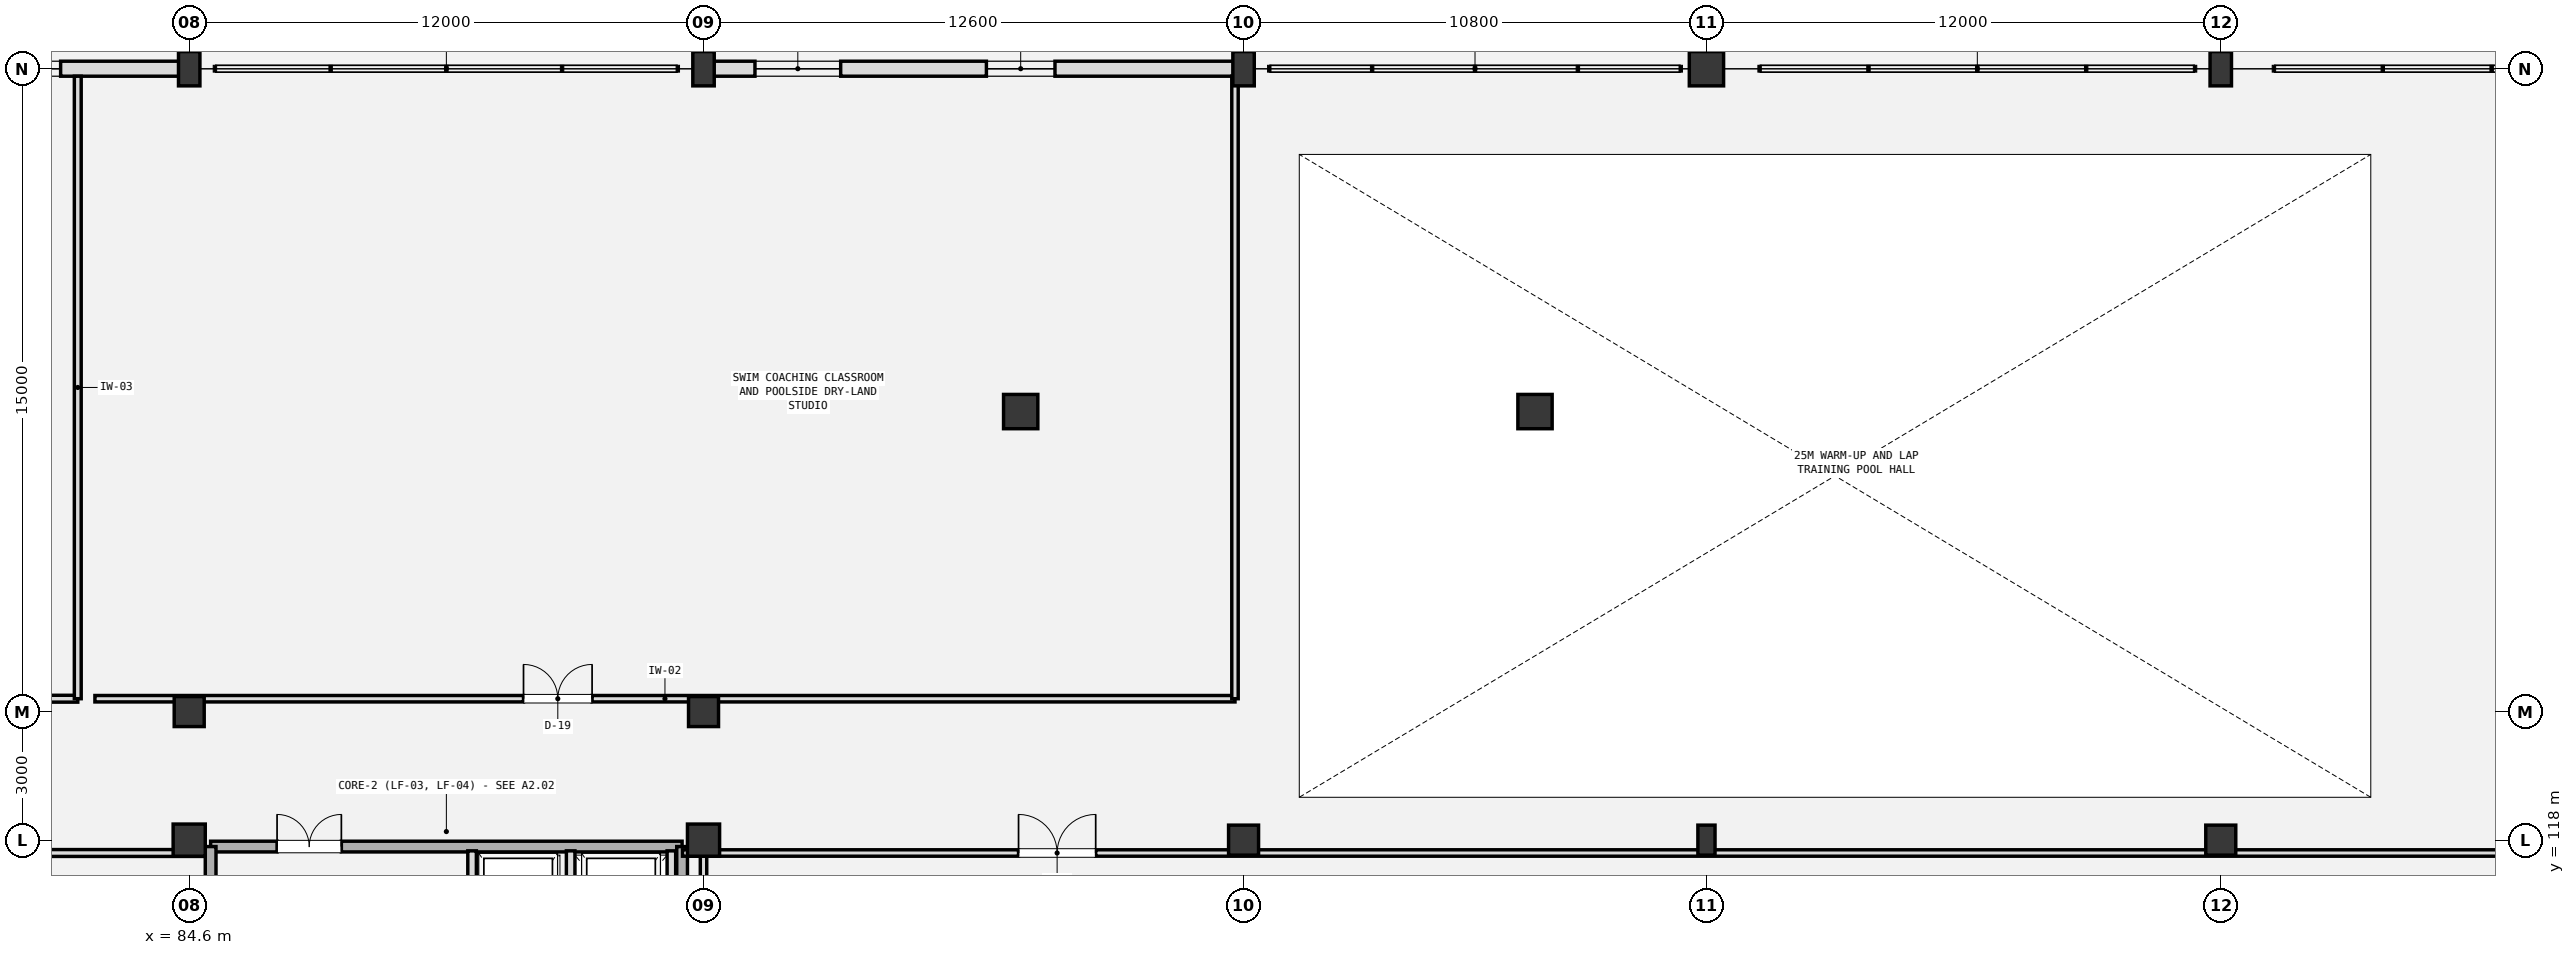
"""IFC4 building model, lengths in metres.
Left out: names, types, materials, properties, quantities, classifications, styles, units other than length and angle.
Written with IfcOpenShell. Run it as: python <this file> out.ifc"""

import sys

from ifc_helpers import new_model, si_unit, direction, frame, frame_2d, origin, origin_2d, place, context, subcontext, project, spatial, rectangle, extrude, element, fill, save


model = new_model("IFC4")
c1 = context("Model", 3, precision=1e-05, world=origin(), true_north=direction((0.0, 1.0)))
c2 = subcontext(c1, "Body", "Model", "MODEL_VIEW")
j1 = project(units=[si_unit("LENGTHUNIT", "METRE"), si_unit("PLANEANGLEUNIT", "RADIAN")], contexts=[c1])
p1 = place(None, origin())
s1 = spatial("IfcSite", under=j1, at=p1, CompositionType="ELEMENT")
p2 = place(p1, origin())
s2 = spatial("IfcBuilding", under=s1, at=p2, CompositionType="ELEMENT")
p3 = place(p2, origin())
s3 = spatial("IfcBuildingStorey", under=s2, at=p3, CompositionType="ELEMENT", Elevation=0.0)
p4 = place(p3, frame((84.6, 118.0, 0.0), z_axis=(0.0, 0.0, 1.0), x_axis=(1.0, 0.0, 0.0)))
e1 = element("IfcColumn", 1, at=p4, inside=s3, PredefinedType="COLUMN", context=c2, shape_type="SweptSolid", body=[
    extrude(rectangle(XDim=0.75, YDim=0.75, at=origin_2d()), origin(), (0.0, 0.0, 1.0), 5.4),
])
p5 = place(p3, frame((84.6, 121.0, 0.0), z_axis=(0.0, 0.0, 1.0), x_axis=(1.0, 0.0, 0.0)))
e2 = element("IfcColumn", 2, at=p5, inside=s3, PredefinedType="COLUMN", context=c2, shape_type="SweptSolid", body=[
    extrude(rectangle(XDim=0.7, YDim=0.7, at=origin_2d()), origin(), (0.0, 0.0, 1.0), 5.4),
])
p6 = place(p3, frame((84.6, 136.0, 0.0), z_axis=(0.0, 0.0, 1.0), x_axis=(1.0, 0.0, 0.0)))
e3 = element("IfcColumn", 3, at=p6, inside=s3, PredefinedType="COLUMN", context=c2, shape_type="SweptSolid", body=[
    extrude(rectangle(XDim=0.5, YDim=0.8, at=origin_2d()), origin(), (0.0, 0.0, 1.0), 5.4),
])
p7 = place(p3, frame((96.6, 118.0, 0.0), z_axis=(0.0, 0.0, 1.0), x_axis=(1.0, 0.0, 0.0)))
e4 = element("IfcColumn", 4, at=p7, inside=s3, PredefinedType="COLUMN", context=c2, shape_type="SweptSolid", body=[
    extrude(rectangle(XDim=0.75, YDim=0.75, at=origin_2d()), origin(), (0.0, 0.0, 1.0), 5.4),
])
p8 = place(p3, frame((96.6, 121.0, 0.0), z_axis=(0.0, 0.0, 1.0), x_axis=(1.0, 0.0, 0.0)))
e5 = element("IfcColumn", 5, at=p8, inside=s3, PredefinedType="COLUMN", context=c2, shape_type="SweptSolid", body=[
    extrude(rectangle(XDim=0.7, YDim=0.7, at=origin_2d()), origin(), (0.0, 0.0, 1.0), 5.4),
])
p9 = place(p3, frame((96.6, 136.0, 0.0), z_axis=(0.0, 0.0, 1.0), x_axis=(1.0, 0.0, 0.0)))
e6 = element("IfcColumn", 6, at=p9, inside=s3, PredefinedType="COLUMN", context=c2, shape_type="SweptSolid", body=[
    extrude(rectangle(XDim=0.5, YDim=0.8, at=origin_2d()), origin(), (0.0, 0.0, 1.0), 5.4),
])
p10 = place(p3, frame((104.0, 128.0, 0.0), z_axis=(0.0, 0.0, 1.0), x_axis=(1.0, 0.0, 0.0)))
e7 = element("IfcColumn", 7, at=p10, inside=s3, PredefinedType="COLUMN", context=c2, shape_type="SweptSolid", body=[
    extrude(rectangle(XDim=0.8, YDim=0.8, at=origin_2d()), origin(), (0.0, 0.0, 1.0), 5.4),
])
p11 = place(p3, frame((109.2, 118.0, 0.0), z_axis=(0.0, 0.0, 1.0), x_axis=(1.0, 0.0, 0.0)))
e8 = element("IfcColumn", 8, at=p11, inside=s3, PredefinedType="COLUMN", context=c2, shape_type="SweptSolid", body=[
    extrude(rectangle(XDim=0.7, YDim=0.7, at=origin_2d()), origin(), (0.0, 0.0, 1.0), 5.4),
])
p12 = place(p3, frame((109.2, 136.0, 0.0), z_axis=(0.0, 0.0, 1.0), x_axis=(1.0, 0.0, 0.0)))
e9 = element("IfcColumn", 9, at=p12, inside=s3, PredefinedType="COLUMN", context=c2, shape_type="SweptSolid", body=[
    extrude(rectangle(XDim=0.5, YDim=0.8, at=origin_2d()), origin(), (0.0, 0.0, 1.0), 5.4),
])
p13 = place(p3, frame((116.0, 128.0, 0.0), z_axis=(0.0, 0.0, 1.0), x_axis=(1.0, 0.0, 0.0)))
e10 = element("IfcColumn", 10, at=p13, inside=s3, PredefinedType="COLUMN", context=c2, shape_type="SweptSolid", body=[
    extrude(rectangle(XDim=0.8, YDim=0.8, at=origin_2d()), origin(), (0.0, 0.0, 1.0), 5.4),
])
p14 = place(p3, frame((120.0, 118.0, 0.0), z_axis=(0.0, 0.0, 1.0), x_axis=(1.0, 0.0, 0.0)))
e11 = element("IfcColumn", 11, at=p14, inside=s3, PredefinedType="PILASTER", context=c2, shape_type="SweptSolid", body=[
    extrude(rectangle(XDim=0.4, YDim=0.7, at=origin_2d()), origin(), (0.0, 0.0, 1.0), 5.4),
])
p15 = place(p3, frame((120.0, 136.0, 0.0), z_axis=(0.0, 0.0, 1.0), x_axis=(1.0, 0.0, 0.0)))
e12 = element("IfcColumn", 12, at=p15, inside=s3, PredefinedType="COLUMN", context=c2, shape_type="SweptSolid", body=[
    extrude(rectangle(XDim=0.8, YDim=0.8, at=origin_2d()), origin(), (0.0, 0.0, 1.0), 5.4),
])
p16 = place(p3, frame((132.0, 118.0, 0.0), z_axis=(0.0, 0.0, 1.0), x_axis=(1.0, 0.0, 0.0)))
e13 = element("IfcColumn", 13, at=p16, inside=s3, PredefinedType="COLUMN", context=c2, shape_type="SweptSolid", body=[
    extrude(rectangle(XDim=0.7, YDim=0.7, at=origin_2d()), origin(), (0.0, 0.0, 1.0), 5.4),
])
p17 = place(p3, frame((132.0, 136.0, 0.0), z_axis=(0.0, 0.0, 1.0), x_axis=(1.0, 0.0, 0.0)))
e14 = element("IfcColumn", 14, at=p17, inside=s3, PredefinedType="COLUMN", context=c2, shape_type="SweptSolid", body=[
    extrude(rectangle(XDim=0.5, YDim=0.8, at=origin_2d()), origin(), (0.0, 0.0, 1.0), 5.4),
])
p18 = place(p3, frame((72.6, 136.0, 0.0), z_axis=(0.0, 0.0, 1.0), x_axis=(1.0, 0.0, 0.0)))
e15 = element("IfcWall", 15, at=p18, inside=s3, PredefinedType="SOLIDWALL", context=c2, shape_type="SweptSolid", body=[
    extrude(rectangle(XDim=12.0, YDim=0.35, at=frame_2d((6.0, 0.0))), origin(), (0.0, 0.0, 1.0), 4.53),
])
p19 = place(p18, frame((1.2, 0.0, 0.95)))
e16 = element("IfcOpeningElement", 16, at=p19, cuts=e15, PredefinedType="OPENING", context=c2, shape_type="SweptSolid", body=[
    extrude(rectangle(XDim=2.8, YDim=1.2, at=frame_2d((1.4, 0.6))), frame((0.0, 0.185, 0.0), z_axis=(0.0, -1.0, 0.0), x_axis=(1.0, 0.0, 0.0)), (0.0, 0.0, 1.0), 0.37),
])
p20 = place(p18, frame((6.6, 0.0, 0.95)))
e17 = element("IfcOpeningElement", 17, at=p20, cuts=e15, PredefinedType="OPENING", context=c2, shape_type="SweptSolid", body=[
    extrude(rectangle(XDim=2.4, YDim=1.2, at=frame_2d((1.2, 0.6))), frame((0.0, 0.185, 0.0), z_axis=(0.0, -1.0, 0.0), x_axis=(1.0, 0.0, 0.0)), (0.0, 0.0, 1.0), 0.37),
])
p21 = place(p3, frame((96.6, 136.0, 0.0), z_axis=(0.0, 0.0, 1.0), x_axis=(1.0, 0.0, 0.0)))
e18 = element("IfcWall", 18, at=p21, inside=s3, PredefinedType="SOLIDWALL", context=c2, shape_type="SweptSolid", body=[
    extrude(rectangle(XDim=12.6, YDim=0.35, at=frame_2d((6.3, 0.0))), origin(), (0.0, 0.0, 1.0), 4.84),
])
p22 = place(p21, frame((1.2, 0.0, 0.95)))
e19 = element("IfcOpeningElement", 19, at=p22, cuts=e18, PredefinedType="OPENING", context=c2, shape_type="SweptSolid", body=[
    extrude(rectangle(XDim=2.0, YDim=1.2, at=frame_2d((1.0, 0.6))), frame((0.0, 0.185, 0.0), z_axis=(0.0, -1.0, 0.0), x_axis=(1.0, 0.0, 0.0)), (0.0, 0.0, 1.0), 0.37),
])
p23 = place(p21, frame((6.6, 0.0, 0.95)))
e20 = element("IfcOpeningElement", 20, at=p23, cuts=e18, PredefinedType="OPENING", context=c2, shape_type="SweptSolid", body=[
    extrude(rectangle(XDim=1.6, YDim=1.2, at=frame_2d((0.8, 0.6))), frame((0.0, 0.185, 0.0), z_axis=(0.0, -1.0, 0.0), x_axis=(1.0, 0.0, 0.0)), (0.0, 0.0, 1.0), 0.37),
])
p24 = place(p3, frame((85.1, 117.85, 0.0), z_axis=(0.0, 0.0, 1.0), x_axis=(1.0, 0.0, 0.0)))
e21 = element("IfcWall", 21, at=p24, inside=s3, PredefinedType="SHEAR", context=c2, shape_type="SweptSolid", body=[
    extrude(rectangle(XDim=11.0, YDim=0.25, at=frame_2d((5.5, 0.0))), origin(), (0.0, 0.0, 1.0), 5.08),
])
p25 = place(p24, frame((1.55, 0.0, 0.0)))
e22 = element("IfcOpeningElement", 22, at=p25, cuts=e21, PredefinedType="OPENING", context=c2, shape_type="SweptSolid", body=[
    extrude(rectangle(XDim=1.5, YDim=2.2, at=frame_2d((0.75, 1.1))), frame((0.0, 0.135, 0.0), z_axis=(0.0, -1.0, 0.0), x_axis=(1.0, 0.0, 0.0)), (0.0, 0.0, 1.0), 0.27),
])
for number, where, z_axis, x_axis in (
    (23, (85.1, 108.95, 0.0), (0.0, 0.0, 1.0), (0.0, 1.0, 0.0)),
    (24, (96.1, 108.95, 0.0), (0.0, 0.0, 1.0), (0.0, 1.0, 0.0)),
):
    element("IfcWall", number, at=place(p3, frame(where, z_axis=z_axis, x_axis=x_axis)), inside=s3, PredefinedType="SHEAR", context=c2, shape_type="SweptSolid", body=[
        extrude(rectangle(XDim=8.9, YDim=0.25, at=frame_2d((4.45, 0.0))), origin(), (0.0, 0.0, 1.0), 5.08),
    ])
for number, where, z_axis, x_axis in (
    (25, (93.5, 115.0, 0.0), (0.0, 0.0, 1.0), (0.0, 1.0, 0.0)),
    (26, (95.85, 115.0, 0.0), (0.0, 0.0, 1.0), (0.0, 1.0, 0.0)),
    (27, (91.2, 115.0, 0.0), (0.0, 0.0, 1.0), (0.0, 1.0, 0.0)),
):
    element("IfcWall", number, at=place(p3, frame(where, z_axis=z_axis, x_axis=x_axis)), inside=s3, PredefinedType="SOLIDWALL", context=c2, shape_type="SweptSolid", body=[
        extrude(rectangle(XDim=2.75, YDim=0.2, at=frame_2d((1.375, 0.0))), origin(), (0.0, 0.0, 1.0), 5.08),
    ])
p26 = place(p3, frame((54.4, 121.3, 0.0), z_axis=(0.0, 0.0, 1.0), x_axis=(1.0, 0.0, 0.0)))
e28 = element("IfcWall", 28, at=p26, inside=s3, PredefinedType="PLUMBINGWALL", context=c2, shape_type="SweptSolid", body=[
    extrude(rectangle(XDim=27.6, YDim=0.16, at=frame_2d((13.8, 0.0))), origin(), (0.0, 0.0, 1.0), 3.9),
])
p27 = place(p26, frame((10.0, 0.0, 0.0)))
e29 = element("IfcOpeningElement", 29, at=p27, cuts=e28, PredefinedType="OPENING", context=c2, shape_type="SweptSolid", body=[
    extrude(rectangle(XDim=1.6, YDim=2.2, at=frame_2d((0.8, 1.1))), frame((0.0, 0.09, 0.0), z_axis=(0.0, -1.0, 0.0), x_axis=(1.0, 0.0, 0.0)), (0.0, 0.0, 1.0), 0.18),
])
p28 = place(p3, frame((82.0, 121.3, 0.0), z_axis=(0.0, 0.0, 1.0), x_axis=(0.0, 1.0, 0.0)))
e30 = element("IfcWall", 30, at=p28, inside=s3, PredefinedType="PLUMBINGWALL", context=c2, shape_type="SweptSolid", body=[
    extrude(rectangle(XDim=14.525, YDim=0.16, at=frame_2d((7.262, 0.0))), origin(), (0.0, 0.0, 1.0), 3.9),
])
p29 = place(p3, frame((82.4, 121.3, 0.0), z_axis=(0.0, 0.0, 1.0), x_axis=(1.0, 0.0, 0.0)))
e31 = element("IfcWall", 31, at=p29, inside=s3, PredefinedType="PARTITIONING", context=c2, shape_type="SweptSolid", body=[
    extrude(rectangle(XDim=26.6, YDim=0.15, at=frame_2d((13.3, 0.0))), origin(), (0.0, 0.0, 1.0), 3.9),
])
p30 = place(p29, frame((10.0, 0.0, 0.0)))
e32 = element("IfcOpeningElement", 32, at=p30, cuts=e31, PredefinedType="OPENING", context=c2, shape_type="SweptSolid", body=[
    extrude(rectangle(XDim=1.6, YDim=2.2, at=frame_2d((0.8, 1.1))), frame((0.0, 0.085, 0.0), z_axis=(0.0, -1.0, 0.0), x_axis=(1.0, 0.0, 0.0)), (0.0, 0.0, 1.0), 0.17),
])
p31 = place(p3, frame((109.0, 121.3, 0.0), z_axis=(0.0, 0.0, 1.0), x_axis=(0.0, 1.0, 0.0)))
e33 = element("IfcWall", 33, at=p31, inside=s3, PredefinedType="PARTITIONING", context=c2, shape_type="SweptSolid", body=[
    extrude(rectangle(XDim=14.525, YDim=0.15, at=frame_2d((7.262, 0.0))), origin(), (0.0, 0.0, 1.0), 3.9),
])
p32 = place(p3, frame((75.01, 117.7, 0.0), z_axis=(0.0, 0.0, 1.0), x_axis=(1.0, 0.0, 0.0)))
e34 = element("IfcWall", 34, at=p32, inside=s3, PredefinedType="PLUMBINGWALL", context=c2, shape_type="SweptSolid", body=[
    extrude(rectangle(XDim=9.965, YDim=0.16, at=frame_2d((4.982, 0.0))), origin(), (0.0, 0.0, 1.0), 3.9),
])
p33 = place(p32, frame((3.99, 0.0, 0.0)))
e35 = element("IfcOpeningElement", 35, at=p33, cuts=e34, PredefinedType="OPENING", context=c2, shape_type="SweptSolid", body=[
    extrude(rectangle(XDim=0.95, YDim=2.15, at=frame_2d((0.475, 1.075))), frame((0.0, 0.09, 0.0), z_axis=(0.0, -1.0, 0.0), x_axis=(1.0, 0.0, 0.0)), (0.0, 0.0, 1.0), 0.18),
])
p34 = place(p3, frame((96.6, 108.775, 0.0), z_axis=(0.0, 0.0, 1.0), x_axis=(0.0, 1.0, 0.0)))
e36 = element("IfcWall", 36, at=p34, inside=s3, PredefinedType="PARTITIONING", context=c2, shape_type="SweptSolid", body=[
    extrude(rectangle(XDim=8.925, YDim=0.15, at=frame_2d((4.462, 0.0))), origin(), (0.0, 0.0, 1.0), 3.9),
])
p35 = place(p3, frame((96.11, 117.7, 0.0), z_axis=(0.0, 0.0, 1.0), x_axis=(1.0, 0.0, 0.0)))
e37 = element("IfcWall", 37, at=p35, inside=s3, PredefinedType="PARTITIONING", context=c2, shape_type="SweptSolid", body=[
    extrude(rectangle(XDim=48.29, YDim=0.15, at=frame_2d((24.145, 0.0))), origin(), (0.0, 0.0, 1.0), 3.9),
])
p36 = place(p35, frame((7.84, 0.0, 0.0)))
e38 = element("IfcOpeningElement", 38, at=p36, cuts=e37, PredefinedType="OPENING", context=c2, shape_type="SweptSolid", body=[
    extrude(rectangle(XDim=1.8, YDim=2.4, at=frame_2d((0.9, 1.2))), frame((0.0, 0.085, 0.0), z_axis=(0.0, -1.0, 0.0), x_axis=(1.0, 0.0, 0.0)), (0.0, 0.0, 1.0), 0.17),
])
p37 = place(p20, origin())
e39 = element("IfcWindow", 39, at=p37, inside=s3, PartitioningType="DOUBLE_PANEL_HORIZONTAL", PredefinedType="WINDOW", context=c2, shape_type="SweptSolid", body=[
    extrude(rectangle(XDim=2.4, YDim=1.2, at=frame_2d((1.2, 0.6))), frame((0.0, 0.03, 0.0), z_axis=(0.0, -1.0, 0.0), x_axis=(1.0, 0.0, 0.0)), (0.0, 0.0, 1.0), 0.06),
])
fill(e17, e39)
p38 = place(p22, origin())
e40 = element("IfcWindow", 40, at=p38, inside=s3, PartitioningType="DOUBLE_PANEL_VERTICAL", PredefinedType="WINDOW", context=c2, shape_type="SweptSolid", body=[
    extrude(rectangle(XDim=2.0, YDim=1.2, at=frame_2d((1.0, 0.6))), frame((0.0, 0.03, 0.0), z_axis=(0.0, -1.0, 0.0), x_axis=(1.0, 0.0, 0.0)), (0.0, 0.0, 1.0), 0.06),
])
fill(e19, e40)
p39 = place(p23, origin())
e41 = element("IfcWindow", 41, at=p39, inside=s3, PartitioningType="SINGLE_PANEL", PredefinedType="WINDOW", context=c2, shape_type="SweptSolid", body=[
    extrude(rectangle(XDim=1.6, YDim=1.2, at=frame_2d((0.8, 0.6))), frame((0.0, 0.03, 0.0), z_axis=(0.0, -1.0, 0.0), x_axis=(1.0, 0.0, 0.0)), (0.0, 0.0, 1.0), 0.06),
])
fill(e20, e41)
p40 = place(p25, origin())
e42 = element("IfcDoor", 42, at=p40, inside=s3, OperationType="DOUBLE_DOOR_SINGLE_SWING", PredefinedType="DOOR", context=c2, shape_type="SweptSolid", body=[
    extrude(rectangle(XDim=1.5, YDim=2.2, at=frame_2d((0.75, 1.1))), frame((0.0, 0.025, 0.0), z_axis=(0.0, -1.0, 0.0), x_axis=(1.0, 0.0, 0.0)), (0.0, 0.0, 1.0), 0.05),
])
fill(e22, e42)
p41 = place(p30, origin())
e43 = element("IfcDoor", 43, at=p41, inside=s3, OperationType="DOUBLE_DOOR_SINGLE_SWING", PredefinedType="DOOR", context=c2, shape_type="SweptSolid", body=[
    extrude(rectangle(XDim=1.6, YDim=2.2, at=frame_2d((0.8, 1.1))), frame((0.0, 0.025, 0.0), z_axis=(0.0, -1.0, 0.0), x_axis=(1.0, 0.0, 0.0)), (0.0, 0.0, 1.0), 0.05),
])
fill(e32, e43)
p42 = place(p36, origin())
e44 = element("IfcDoor", 44, at=p42, inside=s3, OperationType="DOUBLE_DOOR_SINGLE_SWING", PredefinedType="DOOR", context=c2, shape_type="SweptSolid", body=[
    extrude(rectangle(XDim=1.8, YDim=2.4, at=frame_2d((0.9, 1.2))), frame((0.0, 0.025, 0.0), z_axis=(0.0, -1.0, 0.0), x_axis=(1.0, 0.0, 0.0)), (0.0, 0.0, 1.0), 0.05),
])
fill(e38, e44)
save(model, sys.argv[1])
